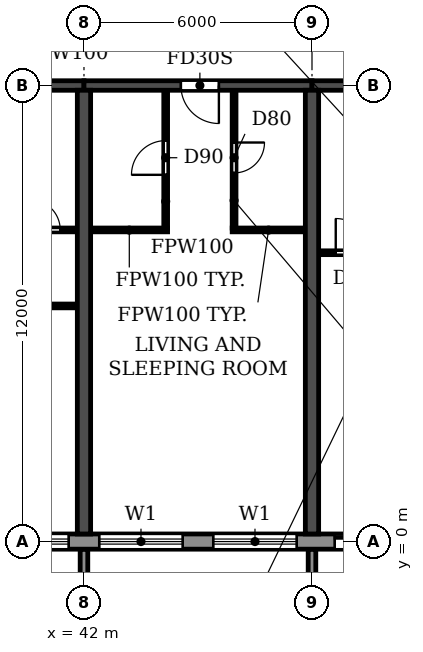
"""IFC4 building model, lengths in metres.
Left out: names, types, materials, properties, quantities, classifications, styles, units other than length and angle.
Written with IfcOpenShell. Run it as: python <this file> out.ifc"""

import sys

from ifc_helpers import new_model, si_unit, direction, frame, frame_2d, origin, place, context, subcontext, project, spatial, polyline, rectangle, outline, extrude, source, transform, mapped, element, fill, save


model = new_model("IFC4")
c1 = context("Model", 3, precision=1e-05, world=origin(), true_north=direction((0.0, 1.0)))
c2 = subcontext(c1, "Body", "Model", "MODEL_VIEW")
j1 = project(units=[si_unit("LENGTHUNIT", "METRE"), si_unit("PLANEANGLEUNIT", "RADIAN")], contexts=[c1])
p1 = place(None, origin())
s1 = spatial("IfcSite", under=j1, at=p1, CompositionType="ELEMENT")
p2 = place(p1, origin())
s2 = spatial("IfcBuilding", under=s1, at=p2, CompositionType="ELEMENT")
p3 = place(p2, frame((0.0, 0.0, 72.9)))
s3 = spatial("IfcBuildingStorey", under=s2, at=p3, CompositionType="ELEMENT", Elevation=72.9)
for number, where, z_axis, x_axis in (
    (1, (42.0, 0.2, 0.0), (0.0, 0.0, 1.0), (0.0, 1.0, 0.0)),
    (2, (48.0, 0.2, 0.0), (0.0, 0.0, 1.0), (0.0, 1.0, 0.0)),
):
    element("IfcWall", number, at=place(p3, frame(where, z_axis=z_axis, x_axis=x_axis)), inside=s3, PredefinedType="SHEAR", context=c2, shape_type="SweptSolid", body=[
        extrude(rectangle(XDim=11.675, YDim=0.35, at=frame_2d((5.837, 0.0))), origin(), (0.0, 0.0, 1.0), 3.06),
    ])
p4 = place(p3, frame((36.0, 12.0, 0.0), z_axis=(0.0, 0.0, 1.0), x_axis=(1.0, 0.0, 0.0)))
e3 = element("IfcWall", 3, at=p4, inside=s3, PredefinedType="SHEAR", context=c2, shape_type="SweptSolid", body=[
    extrude(rectangle(XDim=6.0, YDim=0.25, at=frame_2d((3.0, 0.0))), origin(), (0.0, 0.0, 1.0), 2.46),
])
p5 = place(p4, frame((2.55, 0.0, 0.0)))
e4 = element("IfcOpeningElement", 4, at=p5, cuts=e3, PredefinedType="OPENING", context=c2, shape_type="SweptSolid", body=[
    extrude(rectangle(XDim=1.0, YDim=2.1, at=frame_2d((0.5, 1.05))), frame((0.0, 0.135, 0.0), z_axis=(0.0, -1.0, 0.0), x_axis=(1.0, 0.0, 0.0)), (0.0, 0.0, 1.0), 0.27),
])
p6 = place(p3, frame((42.0, 12.0, 0.0), z_axis=(0.0, 0.0, 1.0), x_axis=(1.0, 0.0, 0.0)))
e5 = element("IfcWall", 5, at=p6, inside=s3, PredefinedType="SHEAR", context=c2, shape_type="SweptSolid", body=[
    extrude(rectangle(XDim=6.0, YDim=0.25, at=frame_2d((3.0, 0.0))), origin(), (0.0, 0.0, 1.0), 2.46),
])
p7 = place(p6, frame((2.55, 0.0, 0.0)))
e6 = element("IfcOpeningElement", 6, at=p7, cuts=e5, PredefinedType="OPENING", context=c2, shape_type="SweptSolid", body=[
    extrude(rectangle(XDim=1.0, YDim=2.1, at=frame_2d((0.5, 1.05))), frame((0.0, 0.135, 0.0), z_axis=(0.0, -1.0, 0.0), x_axis=(1.0, 0.0, 0.0)), (0.0, 0.0, 1.0), 0.27),
])
p8 = place(p3, frame((48.0, 12.0, 0.0), z_axis=(0.0, 0.0, 1.0), x_axis=(1.0, 0.0, 0.0)))
e7 = element("IfcWall", 7, at=p8, inside=s3, PredefinedType="SHEAR", context=c2, shape_type="SweptSolid", body=[
    extrude(rectangle(XDim=6.0, YDim=0.25, at=frame_2d((3.0, 0.0))), origin(), (0.0, 0.0, 1.0), 2.46),
])
p9 = place(p8, frame((2.55, 0.0, 0.0)))
e8 = element("IfcOpeningElement", 8, at=p9, cuts=e7, PredefinedType="OPENING", context=c2, shape_type="SweptSolid", body=[
    extrude(rectangle(XDim=1.0, YDim=2.1, at=frame_2d((0.5, 1.05))), frame((0.0, 0.135, 0.0), z_axis=(0.0, -1.0, 0.0), x_axis=(1.0, 0.0, 0.0)), (0.0, 0.0, 1.0), 0.27),
])
p10 = place(p3, frame((10.683, 0.0, 0.0), z_axis=(0.0, 0.0, 1.0), x_axis=(1.0, 0.0, 0.0)))
e9 = element("IfcWall", 9, at=p10, inside=s3, PredefinedType="STANDARD", context=c2, shape_type="SweptSolid", body=[
    extrude(rectangle(XDim=80.634, YDim=0.4, at=frame_2d((40.317, 0.0))), origin(), (0.0, 0.0, 1.0), 3.06),
])
p11 = place(p10, frame((1.717, 0.0, 0.9)))
e10 = element("IfcOpeningElement", 10, at=p11, cuts=e9, PredefinedType="OPENING", context=c2, shape_type="SweptSolid", body=[
    extrude(rectangle(XDim=2.2, YDim=1.5, at=frame_2d((1.1, 0.75))), frame((0.0, 0.21, 0.0), z_axis=(0.0, -1.0, 0.0), x_axis=(1.0, 0.0, 0.0)), (0.0, 0.0, 1.0), 0.42),
])
p12 = place(p10, frame((4.917, 0.0, 0.0)))
e11 = element("IfcOpeningElement", 11, at=p12, cuts=e9, PredefinedType="OPENING", context=c2, shape_type="SweptSolid", body=[
    extrude(rectangle(XDim=1.8, YDim=2.4, at=frame_2d((0.9, 1.2))), frame((0.0, 0.21, 0.0), z_axis=(0.0, -1.0, 0.0), x_axis=(1.0, 0.0, 0.0)), (0.0, 0.0, 1.0), 0.42),
])
p13 = place(p10, frame((7.717, 0.0, 0.9)))
e12 = element("IfcOpeningElement", 12, at=p13, cuts=e9, PredefinedType="OPENING", context=c2, shape_type="SweptSolid", body=[
    extrude(rectangle(XDim=2.2, YDim=1.5, at=frame_2d((1.1, 0.75))), frame((0.0, 0.21, 0.0), z_axis=(0.0, -1.0, 0.0), x_axis=(1.0, 0.0, 0.0)), (0.0, 0.0, 1.0), 0.42),
])
p14 = place(p10, frame((10.717, 0.0, 0.9)))
e13 = element("IfcOpeningElement", 13, at=p14, cuts=e9, PredefinedType="OPENING", context=c2, shape_type="SweptSolid", body=[
    extrude(rectangle(XDim=2.2, YDim=1.5, at=frame_2d((1.1, 0.75))), frame((0.0, 0.21, 0.0), z_axis=(0.0, -1.0, 0.0), x_axis=(1.0, 0.0, 0.0)), (0.0, 0.0, 1.0), 0.42),
])
p15 = place(p10, frame((13.717, 0.0, 0.9)))
e14 = element("IfcOpeningElement", 14, at=p15, cuts=e9, PredefinedType="OPENING", context=c2, shape_type="SweptSolid", body=[
    extrude(rectangle(XDim=2.2, YDim=1.5, at=frame_2d((1.1, 0.75))), frame((0.0, 0.21, 0.0), z_axis=(0.0, -1.0, 0.0), x_axis=(1.0, 0.0, 0.0)), (0.0, 0.0, 1.0), 0.42),
])
p16 = place(p10, frame((16.917, 0.0, 0.0)))
e15 = element("IfcOpeningElement", 15, at=p16, cuts=e9, PredefinedType="OPENING", context=c2, shape_type="SweptSolid", body=[
    extrude(rectangle(XDim=1.8, YDim=2.4, at=frame_2d((0.9, 1.2))), frame((0.0, 0.21, 0.0), z_axis=(0.0, -1.0, 0.0), x_axis=(1.0, 0.0, 0.0)), (0.0, 0.0, 1.0), 0.42),
])
p17 = place(p10, frame((19.717, 0.0, 0.9)))
e16 = element("IfcOpeningElement", 16, at=p17, cuts=e9, PredefinedType="OPENING", context=c2, shape_type="SweptSolid", body=[
    extrude(rectangle(XDim=2.2, YDim=1.5, at=frame_2d((1.1, 0.75))), frame((0.0, 0.21, 0.0), z_axis=(0.0, -1.0, 0.0), x_axis=(1.0, 0.0, 0.0)), (0.0, 0.0, 1.0), 0.42),
])
p18 = place(p10, frame((22.717, 0.0, 0.9)))
e17 = element("IfcOpeningElement", 17, at=p18, cuts=e9, PredefinedType="OPENING", context=c2, shape_type="SweptSolid", body=[
    extrude(rectangle(XDim=2.2, YDim=1.5, at=frame_2d((1.1, 0.75))), frame((0.0, 0.21, 0.0), z_axis=(0.0, -1.0, 0.0), x_axis=(1.0, 0.0, 0.0)), (0.0, 0.0, 1.0), 0.42),
])
p19 = place(p10, frame((25.917, 0.0, 0.0)))
e18 = element("IfcOpeningElement", 18, at=p19, cuts=e9, PredefinedType="OPENING", context=c2, shape_type="SweptSolid", body=[
    extrude(rectangle(XDim=1.8, YDim=2.4, at=frame_2d((0.9, 1.2))), frame((0.0, 0.21, 0.0), z_axis=(0.0, -1.0, 0.0), x_axis=(1.0, 0.0, 0.0)), (0.0, 0.0, 1.0), 0.42),
])
p20 = place(p10, frame((28.717, 0.0, 0.9)))
e19 = element("IfcOpeningElement", 19, at=p20, cuts=e9, PredefinedType="OPENING", context=c2, shape_type="SweptSolid", body=[
    extrude(rectangle(XDim=2.2, YDim=1.5, at=frame_2d((1.1, 0.75))), frame((0.0, 0.21, 0.0), z_axis=(0.0, -1.0, 0.0), x_axis=(1.0, 0.0, 0.0)), (0.0, 0.0, 1.0), 0.42),
])
p21 = place(p10, frame((31.717, 0.0, 0.9)))
e20 = element("IfcOpeningElement", 20, at=p21, cuts=e9, PredefinedType="OPENING", context=c2, shape_type="SweptSolid", body=[
    extrude(rectangle(XDim=2.2, YDim=1.5, at=frame_2d((1.1, 0.75))), frame((0.0, 0.21, 0.0), z_axis=(0.0, -1.0, 0.0), x_axis=(1.0, 0.0, 0.0)), (0.0, 0.0, 1.0), 0.42),
])
p22 = place(p10, frame((34.717, 0.0, 0.9)))
e21 = element("IfcOpeningElement", 21, at=p22, cuts=e9, PredefinedType="OPENING", context=c2, shape_type="SweptSolid", body=[
    extrude(rectangle(XDim=2.2, YDim=1.5, at=frame_2d((1.1, 0.75))), frame((0.0, 0.21, 0.0), z_axis=(0.0, -1.0, 0.0), x_axis=(1.0, 0.0, 0.0)), (0.0, 0.0, 1.0), 0.42),
])
p23 = place(p10, frame((37.917, 0.0, 0.0)))
e22 = element("IfcOpeningElement", 22, at=p23, cuts=e9, PredefinedType="OPENING", context=c2, shape_type="SweptSolid", body=[
    extrude(rectangle(XDim=1.8, YDim=2.4, at=frame_2d((0.9, 1.2))), frame((0.0, 0.21, 0.0), z_axis=(0.0, -1.0, 0.0), x_axis=(1.0, 0.0, 0.0)), (0.0, 0.0, 1.0), 0.42),
])
p24 = place(p10, frame((40.717, 0.0, 0.9)))
e23 = element("IfcOpeningElement", 23, at=p24, cuts=e9, PredefinedType="OPENING", context=c2, shape_type="SweptSolid", body=[
    extrude(rectangle(XDim=2.2, YDim=1.5, at=frame_2d((1.1, 0.75))), frame((0.0, 0.21, 0.0), z_axis=(0.0, -1.0, 0.0), x_axis=(1.0, 0.0, 0.0)), (0.0, 0.0, 1.0), 0.42),
])
p25 = place(p10, frame((43.717, 0.0, 0.9)))
e24 = element("IfcOpeningElement", 24, at=p25, cuts=e9, PredefinedType="OPENING", context=c2, shape_type="SweptSolid", body=[
    extrude(rectangle(XDim=2.2, YDim=1.5, at=frame_2d((1.1, 0.75))), frame((0.0, 0.21, 0.0), z_axis=(0.0, -1.0, 0.0), x_axis=(1.0, 0.0, 0.0)), (0.0, 0.0, 1.0), 0.42),
])
p26 = place(p10, frame((46.717, 0.0, 0.9)))
e25 = element("IfcOpeningElement", 25, at=p26, cuts=e9, PredefinedType="OPENING", context=c2, shape_type="SweptSolid", body=[
    extrude(rectangle(XDim=2.2, YDim=1.5, at=frame_2d((1.1, 0.75))), frame((0.0, 0.21, 0.0), z_axis=(0.0, -1.0, 0.0), x_axis=(1.0, 0.0, 0.0)), (0.0, 0.0, 1.0), 0.42),
])
p27 = place(p10, frame((49.917, 0.0, 0.0)))
e26 = element("IfcOpeningElement", 26, at=p27, cuts=e9, PredefinedType="OPENING", context=c2, shape_type="SweptSolid", body=[
    extrude(rectangle(XDim=1.8, YDim=2.4, at=frame_2d((0.9, 1.2))), frame((0.0, 0.21, 0.0), z_axis=(0.0, -1.0, 0.0), x_axis=(1.0, 0.0, 0.0)), (0.0, 0.0, 1.0), 0.42),
])
p28 = place(p10, frame((52.717, 0.0, 0.9)))
e27 = element("IfcOpeningElement", 27, at=p28, cuts=e9, PredefinedType="OPENING", context=c2, shape_type="SweptSolid", body=[
    extrude(rectangle(XDim=2.2, YDim=1.5, at=frame_2d((1.1, 0.75))), frame((0.0, 0.21, 0.0), z_axis=(0.0, -1.0, 0.0), x_axis=(1.0, 0.0, 0.0)), (0.0, 0.0, 1.0), 0.42),
])
p29 = place(p10, frame((55.717, 0.0, 0.9)))
e28 = element("IfcOpeningElement", 28, at=p29, cuts=e9, PredefinedType="OPENING", context=c2, shape_type="SweptSolid", body=[
    extrude(rectangle(XDim=2.2, YDim=1.5, at=frame_2d((1.1, 0.75))), frame((0.0, 0.21, 0.0), z_axis=(0.0, -1.0, 0.0), x_axis=(1.0, 0.0, 0.0)), (0.0, 0.0, 1.0), 0.42),
])
p30 = place(p10, frame((58.717, 0.0, 0.9)))
e29 = element("IfcOpeningElement", 29, at=p30, cuts=e9, PredefinedType="OPENING", context=c2, shape_type="SweptSolid", body=[
    extrude(rectangle(XDim=2.2, YDim=1.5, at=frame_2d((1.1, 0.75))), frame((0.0, 0.21, 0.0), z_axis=(0.0, -1.0, 0.0), x_axis=(1.0, 0.0, 0.0)), (0.0, 0.0, 1.0), 0.42),
])
p31 = place(p10, frame((61.717, 0.0, 0.9)))
e30 = element("IfcOpeningElement", 30, at=p31, cuts=e9, PredefinedType="OPENING", context=c2, shape_type="SweptSolid", body=[
    extrude(rectangle(XDim=2.2, YDim=1.5, at=frame_2d((1.1, 0.75))), frame((0.0, 0.21, 0.0), z_axis=(0.0, -1.0, 0.0), x_axis=(1.0, 0.0, 0.0)), (0.0, 0.0, 1.0), 0.42),
])
p32 = place(p10, frame((64.917, 0.0, 0.0)))
e31 = element("IfcOpeningElement", 31, at=p32, cuts=e9, PredefinedType="OPENING", context=c2, shape_type="SweptSolid", body=[
    extrude(rectangle(XDim=1.8, YDim=2.4, at=frame_2d((0.9, 1.2))), frame((0.0, 0.21, 0.0), z_axis=(0.0, -1.0, 0.0), x_axis=(1.0, 0.0, 0.0)), (0.0, 0.0, 1.0), 0.42),
])
p33 = place(p10, frame((67.717, 0.0, 0.9)))
e32 = element("IfcOpeningElement", 32, at=p33, cuts=e9, PredefinedType="OPENING", context=c2, shape_type="SweptSolid", body=[
    extrude(rectangle(XDim=2.2, YDim=1.5, at=frame_2d((1.1, 0.75))), frame((0.0, 0.21, 0.0), z_axis=(0.0, -1.0, 0.0), x_axis=(1.0, 0.0, 0.0)), (0.0, 0.0, 1.0), 0.42),
])
p34 = place(p10, frame((70.717, 0.0, 0.9)))
e33 = element("IfcOpeningElement", 33, at=p34, cuts=e9, PredefinedType="OPENING", context=c2, shape_type="SweptSolid", body=[
    extrude(rectangle(XDim=2.2, YDim=1.5, at=frame_2d((1.1, 0.75))), frame((0.0, 0.21, 0.0), z_axis=(0.0, -1.0, 0.0), x_axis=(1.0, 0.0, 0.0)), (0.0, 0.0, 1.0), 0.42),
])
p35 = place(p10, frame((73.917, 0.0, 0.0)))
e34 = element("IfcOpeningElement", 34, at=p35, cuts=e9, PredefinedType="OPENING", context=c2, shape_type="SweptSolid", body=[
    extrude(rectangle(XDim=1.8, YDim=2.4, at=frame_2d((0.9, 1.2))), frame((0.0, 0.21, 0.0), z_axis=(0.0, -1.0, 0.0), x_axis=(1.0, 0.0, 0.0)), (0.0, 0.0, 1.0), 0.42),
])
p36 = place(p10, frame((76.717, 0.0, 0.9)))
e35 = element("IfcOpeningElement", 35, at=p36, cuts=e9, PredefinedType="OPENING", context=c2, shape_type="SweptSolid", body=[
    extrude(rectangle(XDim=2.2, YDim=1.5, at=frame_2d((1.1, 0.75))), frame((0.0, 0.21, 0.0), z_axis=(0.0, -1.0, 0.0), x_axis=(1.0, 0.0, 0.0)), (0.0, 0.0, 1.0), 0.42),
])
m1 = source(origin(), c2, "Body", "SweptSolid", [
    extrude(outline(polyline([(0.0, 0.0), (0.2, 0.0), (0.2, 1.65), (0.0, 1.65), (0.0, 0.0)])), origin(), (0.0, 0.0, 1.0), 3.1),
])
for number, where in (
    (36, (41.9, -1.85, 0.0)),
    (37, (47.9, -1.85, 0.0)),
):
    element("IfcWall", number, at=place(p3, frame(where)), inside=s3, PredefinedType="STANDARD", context=c2, shape_type="MappedRepresentation", body=[
        mapped(m1, transform((0.0, 0.0, 0.0))),
    ])
p37 = place(p3, frame((38.95, 6.2, 0.0), z_axis=(0.0, 0.0, 1.0), x_axis=(1.0, 0.0, 0.0)))
e38 = element("IfcWall", 38, at=p37, inside=s3, PredefinedType="PARTITIONING", context=c2, shape_type="SweptSolid", body=[
    extrude(rectangle(XDim=2.865, YDim=0.1, at=frame_2d((1.433, 0.0))), origin(), (0.0, 0.0, 1.0), 3.06),
])
p38 = place(p37, frame((0.55, 0.0, 0.0)))
e39 = element("IfcOpeningElement", 39, at=p38, cuts=e38, PredefinedType="OPENING", context=c2, shape_type="SweptSolid", body=[
    extrude(rectangle(XDim=0.9, YDim=2.1, at=frame_2d((0.45, 1.05))), frame((0.0, 0.06, 0.0), z_axis=(0.0, -1.0, 0.0), x_axis=(1.0, 0.0, 0.0)), (0.0, 0.0, 1.0), 0.12),
])
p39 = place(p3, frame((48.185, 7.6, 0.0), z_axis=(0.0, 0.0, 1.0), x_axis=(1.0, 0.0, 0.0)))
e40 = element("IfcWall", 40, at=p39, inside=s3, PredefinedType="PARTITIONING", context=c2, shape_type="SweptSolid", body=[
    extrude(rectangle(XDim=2.015, YDim=0.1, at=frame_2d((1.007, 0.0))), origin(), (0.0, 0.0, 1.0), 3.06),
])
p40 = place(p39, frame((0.44, 0.0, 0.0)))
e41 = element("IfcOpeningElement", 41, at=p40, cuts=e40, PredefinedType="OPENING", context=c2, shape_type="SweptSolid", body=[
    extrude(rectangle(XDim=0.9, YDim=2.1, at=frame_2d((0.45, 1.05))), frame((0.0, 0.06, 0.0), z_axis=(0.0, -1.0, 0.0), x_axis=(1.0, 0.0, 0.0)), (0.0, 0.0, 1.0), 0.12),
])
p41 = place(p3, frame((39.9, 8.2, 0.0), z_axis=(0.0, 0.0, 1.0), x_axis=(1.0, 0.0, 0.0)))
e42 = element("IfcWall", 42, at=p41, inside=s3, PredefinedType="PARTITIONING", context=c2, shape_type="SweptSolid", body=[
    extrude(rectangle(XDim=1.915, YDim=0.1, at=frame_2d((0.958, 0.0))), origin(), (0.0, 0.0, 1.0), 3.06),
])
p42 = place(p41, frame((0.675, 0.0, 0.0)))
e43 = element("IfcOpeningElement", 43, at=p42, cuts=e42, PredefinedType="OPENING", context=c2, shape_type="SweptSolid", body=[
    extrude(rectangle(XDim=0.8, YDim=2.1, at=frame_2d((0.4, 1.05))), frame((0.0, 0.06, 0.0), z_axis=(0.0, -1.0, 0.0), x_axis=(1.0, 0.0, 0.0)), (0.0, 0.0, 1.0), 0.12),
])
p43 = place(p3, frame((42.185, 8.2, 0.0), z_axis=(0.0, 0.0, 1.0), x_axis=(1.0, 0.0, 0.0)))
e44 = element("IfcWall", 44, at=p43, inside=s3, PredefinedType="PARTITIONING", context=c2, shape_type="SweptSolid", body=[
    extrude(rectangle(XDim=2.015, YDim=0.1, at=frame_2d((1.007, 0.0))), origin(), (0.0, 0.0, 1.0), 3.06),
])
p44 = place(p3, frame((45.9, 8.2, 0.0), z_axis=(0.0, 0.0, 1.0), x_axis=(1.0, 0.0, 0.0)))
e45 = element("IfcWall", 45, at=p44, inside=s3, PredefinedType="PARTITIONING", context=c2, shape_type="SweptSolid", body=[
    extrude(rectangle(XDim=1.915, YDim=0.1, at=frame_2d((0.958, 0.0))), origin(), (0.0, 0.0, 1.0), 3.06),
])
p45 = place(p3, frame((44.15, 8.25, 0.0), z_axis=(0.0, 0.0, 1.0), x_axis=(0.0, 1.0, 0.0)))
e46 = element("IfcWall", 46, at=p45, inside=s3, PredefinedType="PARTITIONING", context=c2, shape_type="SweptSolid", body=[
    extrude(rectangle(XDim=3.615, YDim=0.1, at=frame_2d((1.808, 0.0))), origin(), (0.0, 0.0, 1.0), 3.06),
])
p46 = place(p45, frame((1.4, 0.0, 0.0)))
e47 = element("IfcOpeningElement", 47, at=p46, cuts=e46, PredefinedType="OPENING", context=c2, shape_type="SweptSolid", body=[
    extrude(rectangle(XDim=0.9, YDim=2.1, at=frame_2d((0.45, 1.05))), frame((0.0, 0.06, 0.0), z_axis=(0.0, -1.0, 0.0), x_axis=(1.0, 0.0, 0.0)), (0.0, 0.0, 1.0), 0.12),
])
p47 = place(p3, frame((45.95, 8.25, 0.0), z_axis=(0.0, 0.0, 1.0), x_axis=(0.0, 1.0, 0.0)))
e48 = element("IfcWall", 48, at=p47, inside=s3, PredefinedType="PARTITIONING", context=c2, shape_type="SweptSolid", body=[
    extrude(rectangle(XDim=3.615, YDim=0.1, at=frame_2d((1.808, 0.0))), origin(), (0.0, 0.0, 1.0), 3.06),
])
p48 = place(p47, frame((1.45, 0.0, 0.0)))
e49 = element("IfcOpeningElement", 49, at=p48, cuts=e48, PredefinedType="OPENING", context=c2, shape_type="SweptSolid", body=[
    extrude(rectangle(XDim=0.8, YDim=2.1, at=frame_2d((0.4, 1.05))), frame((0.0, 0.06, 0.0), z_axis=(0.0, -1.0, 0.0), x_axis=(1.0, 0.0, 0.0)), (0.0, 0.0, 1.0), 0.12),
])
p49 = place(p20, origin())
e50 = element("IfcWindow", 50, at=p49, inside=s3, PartitioningType="DOUBLE_PANEL_HORIZONTAL", PredefinedType="WINDOW", context=c2, shape_type="SweptSolid", body=[
    extrude(rectangle(XDim=2.2, YDim=1.5, at=frame_2d((1.1, 0.75))), frame((0.0, 0.03, 0.0), z_axis=(0.0, -1.0, 0.0), x_axis=(1.0, 0.0, 0.0)), (0.0, 0.0, 1.0), 0.06),
])
fill(e19, e50)
p50 = place(p21, origin())
e51 = element("IfcWindow", 51, at=p50, inside=s3, PartitioningType="DOUBLE_PANEL_HORIZONTAL", PredefinedType="WINDOW", context=c2, shape_type="SweptSolid", body=[
    extrude(rectangle(XDim=2.2, YDim=1.5, at=frame_2d((1.1, 0.75))), frame((0.0, 0.03, 0.0), z_axis=(0.0, -1.0, 0.0), x_axis=(1.0, 0.0, 0.0)), (0.0, 0.0, 1.0), 0.06),
])
fill(e20, e51)
p51 = place(p22, origin())
e52 = element("IfcWindow", 52, at=p51, inside=s3, PartitioningType="DOUBLE_PANEL_HORIZONTAL", PredefinedType="WINDOW", context=c2, shape_type="SweptSolid", body=[
    extrude(rectangle(XDim=2.2, YDim=1.5, at=frame_2d((1.1, 0.75))), frame((0.0, 0.03, 0.0), z_axis=(0.0, -1.0, 0.0), x_axis=(1.0, 0.0, 0.0)), (0.0, 0.0, 1.0), 0.06),
])
fill(e21, e52)
p52 = place(p23, origin())
e53 = element("IfcDoor", 53, at=p52, inside=s3, OperationType="DOUBLE_DOOR_SLIDING", PredefinedType="DOOR", context=c2, shape_type="SweptSolid", body=[
    extrude(rectangle(XDim=1.8, YDim=2.4, at=frame_2d((0.9, 1.2))), frame((0.0, 0.025, 0.0), z_axis=(0.0, -1.0, 0.0), x_axis=(1.0, 0.0, 0.0)), (0.0, 0.0, 1.0), 0.05),
])
fill(e22, e53)
p53 = place(p42, origin())
e54 = element("IfcDoor", 54, at=p53, inside=s3, OperationType="SINGLE_SWING_LEFT", PredefinedType="DOOR", context=c2, shape_type="SweptSolid", body=[
    extrude(rectangle(XDim=0.8, YDim=2.1, at=frame_2d((0.4, 1.05))), frame((0.0, 0.025, 0.0), z_axis=(0.0, -1.0, 0.0), x_axis=(1.0, 0.0, 0.0)), (0.0, 0.0, 1.0), 0.05),
])
fill(e43, e54)
p54 = place(p46, origin())
e55 = element("IfcDoor", 55, at=p54, inside=s3, OperationType="SINGLE_SWING_LEFT", PredefinedType="DOOR", context=c2, shape_type="SweptSolid", body=[
    extrude(rectangle(XDim=0.9, YDim=2.1, at=frame_2d((0.45, 1.05))), frame((0.0, 0.025, 0.0), z_axis=(0.0, -1.0, 0.0), x_axis=(1.0, 0.0, 0.0)), (0.0, 0.0, 1.0), 0.05),
])
fill(e47, e55)
p55 = place(p7, frame((1.0, 0.0, 0.0), z_axis=(0.0, 0.0, 1.0), x_axis=(-1.0, 0.0, 0.0)))
e56 = element("IfcDoor", 56, at=p55, inside=s3, OperationType="SINGLE_SWING_LEFT", PredefinedType="DOOR", context=c2, shape_type="SweptSolid", body=[
    extrude(rectangle(XDim=1.0, YDim=2.1, at=frame_2d((0.5, 1.05))), frame((0.0, 0.025, 0.0), z_axis=(0.0, -1.0, 0.0), x_axis=(1.0, 0.0, 0.0)), (0.0, 0.0, 1.0), 0.05),
])
fill(e6, e56)
p56 = place(p48, frame((0.8, 0.0, 0.0), z_axis=(0.0, 0.0, 1.0), x_axis=(-1.0, 0.0, 0.0)))
e57 = element("IfcDoor", 57, at=p56, inside=s3, OperationType="SINGLE_SWING_LEFT", PredefinedType="DOOR", context=c2, shape_type="SweptSolid", body=[
    extrude(rectangle(XDim=0.8, YDim=2.1, at=frame_2d((0.4, 1.05))), frame((0.0, 0.025, 0.0), z_axis=(0.0, -1.0, 0.0), x_axis=(1.0, 0.0, 0.0)), (0.0, 0.0, 1.0), 0.05),
])
fill(e49, e57)
p57 = place(p40, origin())
e58 = element("IfcDoor", 58, at=p57, inside=s3, OperationType="SINGLE_SWING_LEFT", PredefinedType="DOOR", context=c2, shape_type="SweptSolid", body=[
    extrude(rectangle(XDim=0.9, YDim=2.1, at=frame_2d((0.45, 1.05))), frame((0.0, 0.025, 0.0), z_axis=(0.0, -1.0, 0.0), x_axis=(1.0, 0.0, 0.0)), (0.0, 0.0, 1.0), 0.05),
])
fill(e41, e58)
save(model, sys.argv[1])
